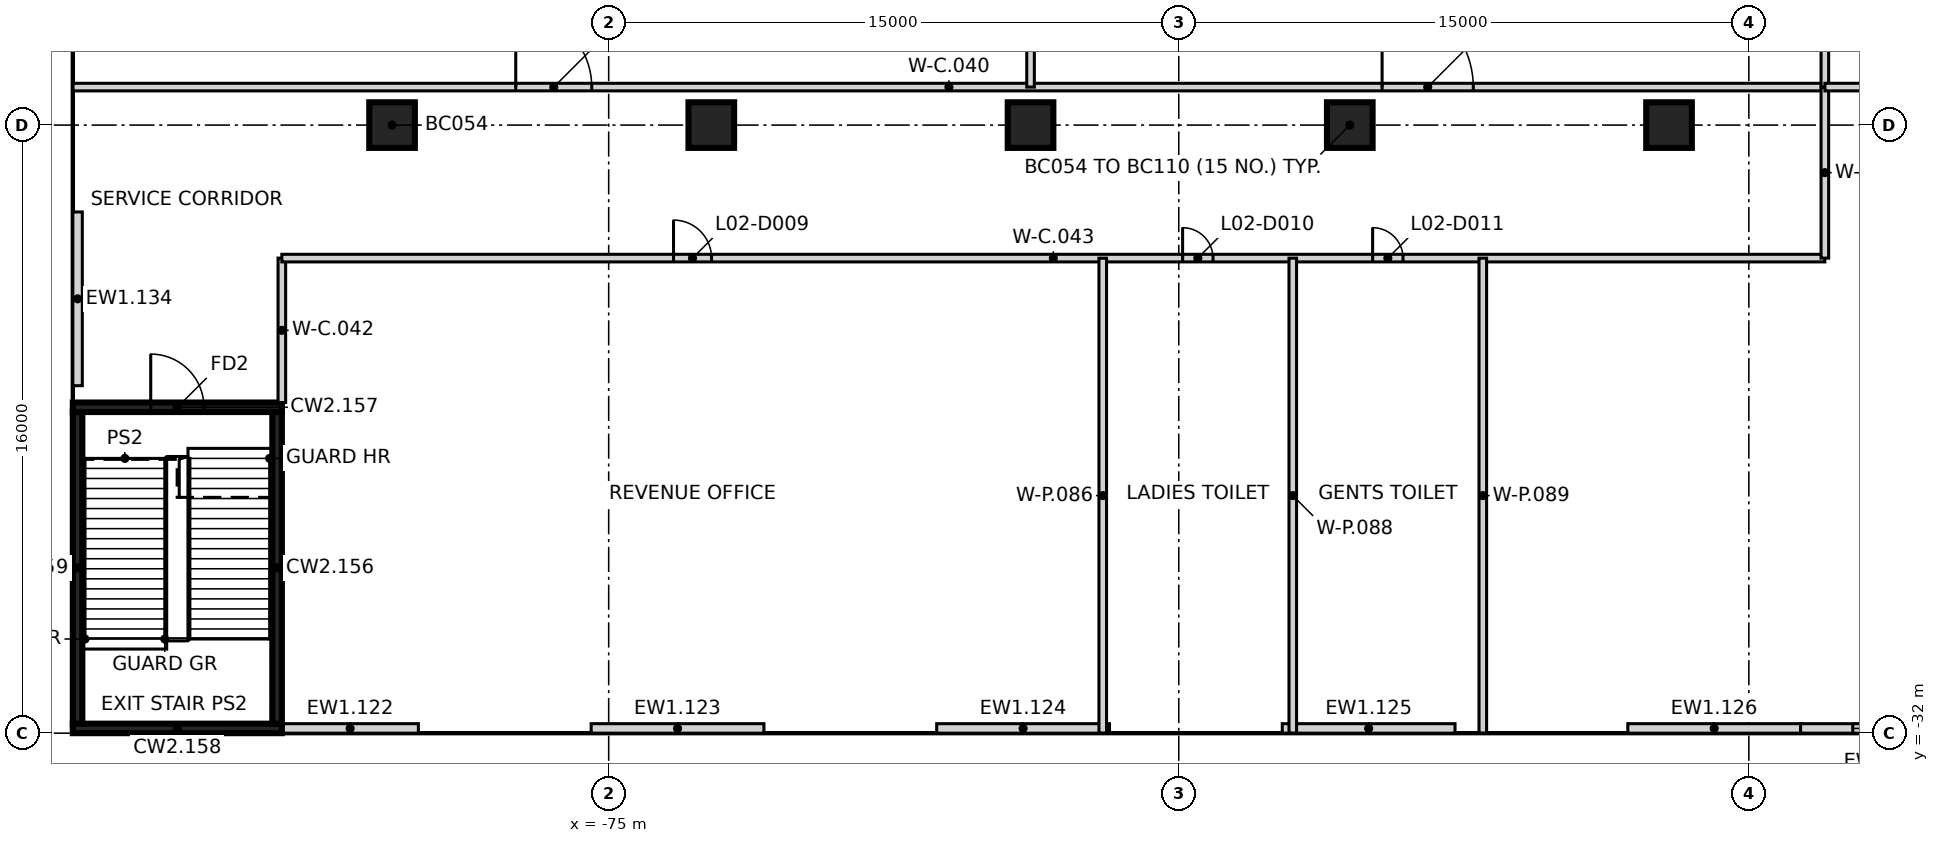
"""IFC4 building model, lengths in metres.
Left out: names, types, materials, properties, quantities, classifications, styles, units other than length and angle.
Written with IfcOpenShell. Run it as: python <this file> out.ifc"""

import sys

from ifc_helpers import new_model, si_unit, direction, frame, frame_2d, origin, origin_2d, place, context, subcontext, project, spatial, rectangle, extrude, element, fill, save


model = new_model("IFC4")
c1 = context("Model", 3, precision=1e-05, world=origin(), true_north=direction((0.0, 1.0)))
c2 = subcontext(c1, "Body", "Model", "MODEL_VIEW")
j1 = project(units=[si_unit("LENGTHUNIT", "METRE"), si_unit("PLANEANGLEUNIT", "RADIAN")], contexts=[c1])
p1 = place(None, origin())
s1 = spatial("IfcSite", under=j1, at=p1, CompositionType="ELEMENT")
p2 = place(p1, origin())
s2 = spatial("IfcBuilding", under=s1, at=p2, CompositionType="ELEMENT")
p3 = place(p2, frame((0.0, 0.0, 14.0)))
s3 = spatial("IfcBuildingStorey", under=s2, at=p3, CompositionType="ELEMENT", Elevation=14.0)
for number, where, z_axis, x_axis in (
    (1, (-80.7, -16.0, -0.35), (0.0, 0.0, 1.0), (1.0, 0.0, 0.0)),
    (2, (-72.3, -16.0, -0.35), (0.0, 0.0, 1.0), (1.0, 0.0, 0.0)),
    (3, (-63.9, -16.0, -0.35), (0.0, 0.0, 1.0), (1.0, 0.0, 0.0)),
    (4, (-55.5, -16.0, -0.35), (0.0, 0.0, 1.0), (1.0, 0.0, 0.0)),
    (5, (-47.1, -16.0, -0.35), (0.0, 0.0, 1.0), (1.0, 0.0, 0.0)),
):
    element("IfcColumn", number, at=place(p3, frame(where, z_axis=z_axis, x_axis=x_axis)), inside=s3, PredefinedType="COLUMN", context=c2, shape_type="SweptSolid", body=[
        extrude(rectangle(XDim=1.2, YDim=1.2, at=origin_2d()), origin(), (0.0, 0.0, 1.0), 5.5),
    ])
p4 = place(p3, frame((-88.975, -22.857, 0.0), z_axis=(0.0, 0.0, 1.0), x_axis=(0.0, 1.0, 0.0)))
e6 = element("IfcWall", 6, at=p4, inside=s3, PredefinedType="SOLIDWALL", context=c2, shape_type="SweptSolid", body=[
    extrude(rectangle(XDim=4.572, YDim=0.25, at=frame_2d((2.286, 0.0))), origin(), (0.0, 0.0, 1.0), 5.15),
])
p5 = place(p3, frame((-80.008, -31.875, 0.0), z_axis=(0.0, 0.0, 1.0), x_axis=(-1.0, 0.0, 0.0)))
e7 = element("IfcWall", 7, at=p5, inside=s3, PredefinedType="SOLIDWALL", context=c2, shape_type="SweptSolid", body=[
    extrude(rectangle(XDim=3.592, YDim=0.25, at=frame_2d((1.796, 0.0))), origin(), (0.0, 0.0, 1.0), 5.15),
])
for number, where, z_axis, x_axis in (
    (8, (-70.915, -31.875, 0.0), (0.0, 0.0, 1.0), (-1.0, 0.0, 0.0)),
    (9, (-61.823, -31.875, 0.0), (0.0, 0.0, 1.0), (-1.0, 0.0, 0.0)),
    (10, (-52.731, -31.875, 0.0), (0.0, 0.0, 1.0), (-1.0, 0.0, 0.0)),
    (11, (-43.638, -31.875, 0.0), (0.0, 0.0, 1.0), (-1.0, 0.0, 0.0)),
):
    element("IfcWall", number, at=place(p3, frame(where, z_axis=z_axis, x_axis=x_axis)), inside=s3, PredefinedType="SOLIDWALL", context=c2, shape_type="SweptSolid", body=[
        extrude(rectangle(XDim=4.546, YDim=0.25, at=frame_2d((2.273, 0.0))), origin(), (0.0, 0.0, 1.0), 5.15),
    ])
p6 = place(p3, frame((-39.092, -31.875, 0.0), z_axis=(0.0, 0.0, 1.0), x_axis=(-1.0, 0.0, 0.0)))
e12 = element("IfcWall", 12, at=p6, inside=s3, PredefinedType="SOLIDWALL", context=c2, shape_type="SweptSolid", body=[
    extrude(rectangle(XDim=4.546, YDim=0.25, at=frame_2d((2.273, 0.0))), origin(), (0.0, 0.0, 1.0), 5.15),
])
p7 = place(p6, frame((1.373, 0.0, 1.1)))
e13 = element("IfcOpeningElement", 13, at=p7, cuts=e12, PredefinedType="OPENING", context=c2, shape_type="SweptSolid", body=[
    extrude(rectangle(XDim=1.8, YDim=1.5, at=frame_2d((0.9, 0.75))), frame((0.0, 0.135, 0.0), z_axis=(0.0, -1.0, 0.0), x_axis=(1.0, 0.0, 0.0)), (0.0, 0.0, 1.0), 0.27),
])
p8 = place(p3, frame((-89.1, -31.875, 0.0), z_axis=(0.0, 0.0, 1.0), x_axis=(1.0, 0.0, 0.0)))
e14 = element("IfcWall", 14, at=p8, inside=s3, PredefinedType="SHEAR", context=c2, shape_type="SweptSolid", body=[
    extrude(rectangle(XDim=5.5, YDim=0.25, at=frame_2d((2.75, 0.0))), origin(), (0.0, 0.0, 1.0), 5.15),
])
p9 = place(p3, frame((-89.1, -23.425, 0.0), z_axis=(0.0, 0.0, 1.0), x_axis=(1.0, 0.0, 0.0)))
e15 = element("IfcWall", 15, at=p9, inside=s3, PredefinedType="SHEAR", context=c2, shape_type="SweptSolid", body=[
    extrude(rectangle(XDim=5.5, YDim=0.25, at=frame_2d((2.75, 0.0))), origin(), (0.0, 0.0, 1.0), 5.15),
])
p10 = place(p9, frame((2.05, 0.0, 0.0)))
e16 = element("IfcOpeningElement", 16, at=p10, cuts=e15, PredefinedType="OPENING", context=c2, shape_type="SweptSolid", body=[
    extrude(rectangle(XDim=1.4, YDim=2.1, at=frame_2d((0.7, 1.05))), frame((0.0, 0.135, 0.0), z_axis=(0.0, -1.0, 0.0), x_axis=(1.0, 0.0, 0.0)), (0.0, 0.0, 1.0), 0.27),
])
for number, where, z_axis, x_axis in (
    (17, (-88.975, -31.75, 0.0), (0.0, 0.0, 1.0), (0.0, 1.0, 0.0)),
    (18, (-83.725, -31.75, 0.0), (0.0, 0.0, 1.0), (0.0, 1.0, 0.0)),
):
    element("IfcWall", number, at=place(p3, frame(where, z_axis=z_axis, x_axis=x_axis)), inside=s3, PredefinedType="SHEAR", context=c2, shape_type="SweptSolid", body=[
        extrude(rectangle(XDim=8.2, YDim=0.25, at=frame_2d((4.1, 0.0))), origin(), (0.0, 0.0, 1.0), 5.15),
    ])
p11 = place(p3, frame((-89.095, -15.0, 0.0), z_axis=(0.0, 0.0, 1.0), x_axis=(1.0, 0.0, 0.0)))
e19 = element("IfcWall", 19, at=p11, inside=s3, PredefinedType="PARTITIONING", context=c2, shape_type="SweptSolid", body=[
    extrude(rectangle(XDim=46.095, YDim=0.2, at=frame_2d((23.047, 0.0))), origin(), (0.0, 0.0, 1.0), 5.15),
])
p12 = place(p11, frame((11.649, 0.0, 0.0)))
e20 = element("IfcOpeningElement", 20, at=p12, cuts=e19, PredefinedType="OPENING", context=c2, shape_type="SweptSolid", body=[
    extrude(rectangle(XDim=2.0, YDim=2.1, at=frame_2d((1.0, 1.05))), frame((0.0, 0.11, 0.0), z_axis=(0.0, -1.0, 0.0), x_axis=(1.0, 0.0, 0.0)), (0.0, 0.0, 1.0), 0.22),
])
p13 = place(p11, frame((34.445, 0.0, 0.0)))
e21 = element("IfcOpeningElement", 21, at=p13, cuts=e19, PredefinedType="OPENING", context=c2, shape_type="SweptSolid", body=[
    extrude(rectangle(XDim=2.4, YDim=2.1, at=frame_2d((1.2, 1.05))), frame((0.0, 0.11, 0.0), z_axis=(0.0, -1.0, 0.0), x_axis=(1.0, 0.0, 0.0)), (0.0, 0.0, 1.0), 0.22),
])
p14 = place(p3, frame((-83.6, -23.3, 0.0), z_axis=(0.0, 0.0, 1.0), x_axis=(0.0, 1.0, 0.0)))
e22 = element("IfcWall", 22, at=p14, inside=s3, PredefinedType="PARTITIONING", context=c2, shape_type="SweptSolid", body=[
    extrude(rectangle(XDim=3.8, YDim=0.2, at=frame_2d((1.9, 0.0))), origin(), (0.0, 0.0, 1.0), 5.15),
])
p15 = place(p3, frame((-83.6, -19.5, 0.0), z_axis=(0.0, 0.0, 1.0), x_axis=(1.0, 0.0, 0.0)))
e23 = element("IfcWall", 23, at=p15, inside=s3, PredefinedType="PARTITIONING", context=c2, shape_type="SweptSolid", body=[
    extrude(rectangle(XDim=40.6, YDim=0.2, at=frame_2d((20.3, 0.0))), origin(), (0.0, 0.0, 1.0), 5.15),
])
p16 = place(p15, frame((10.306, 0.0, 0.0)))
e24 = element("IfcOpeningElement", 24, at=p16, cuts=e23, PredefinedType="OPENING", context=c2, shape_type="SweptSolid", body=[
    extrude(rectangle(XDim=1.0, YDim=2.1, at=frame_2d((0.5, 1.05))), frame((0.0, 0.11, 0.0), z_axis=(0.0, -1.0, 0.0), x_axis=(1.0, 0.0, 0.0)), (0.0, 0.0, 1.0), 0.22),
])
p17 = place(p15, frame((23.701, 0.0, 0.0)))
e25 = element("IfcOpeningElement", 25, at=p17, cuts=e23, PredefinedType="OPENING", context=c2, shape_type="SweptSolid", body=[
    extrude(rectangle(XDim=0.8, YDim=2.1, at=frame_2d((0.4, 1.05))), frame((0.0, 0.11, 0.0), z_axis=(0.0, -1.0, 0.0), x_axis=(1.0, 0.0, 0.0)), (0.0, 0.0, 1.0), 0.22),
])
p18 = place(p15, frame((28.701, 0.0, 0.0)))
e26 = element("IfcOpeningElement", 26, at=p18, cuts=e23, PredefinedType="OPENING", context=c2, shape_type="SweptSolid", body=[
    extrude(rectangle(XDim=0.8, YDim=2.1, at=frame_2d((0.4, 1.05))), frame((0.0, 0.11, 0.0), z_axis=(0.0, -1.0, 0.0), x_axis=(1.0, 0.0, 0.0)), (0.0, 0.0, 1.0), 0.22),
])
p19 = place(p3, frame((-43.0, -19.5, 0.0), z_axis=(0.0, 0.0, 1.0), x_axis=(0.0, 1.0, 0.0)))
e27 = element("IfcWall", 27, at=p19, inside=s3, PredefinedType="PARTITIONING", context=c2, shape_type="SweptSolid", body=[
    extrude(rectangle(XDim=4.498, YDim=0.2, at=frame_2d((2.249, 0.0))), origin(), (0.0, 0.0, 1.0), 5.15),
])
p20 = place(p3, frame((-63.9, -15.0, 0.0), z_axis=(0.0, 0.0, 1.0), x_axis=(0.0, 1.0, 0.0)))
e28 = element("IfcWall", 28, at=p20, inside=s3, PredefinedType="PARTITIONING", context=c2, shape_type="SweptSolid", body=[
    extrude(rectangle(XDim=30.0, YDim=0.2, at=frame_2d((15.0, 0.0))), origin(), (0.0, 0.0, 1.0), 5.15),
])
p21 = place(p20, frame((11.25, 0.0, 0.0)))
e29 = element("IfcOpeningElement", 29, at=p21, cuts=e28, PredefinedType="OPENING", context=c2, shape_type="SweptSolid", body=[
    extrude(rectangle(XDim=2.0, YDim=2.1, at=frame_2d((1.0, 1.05))), frame((0.0, 0.11, 0.0), z_axis=(0.0, -1.0, 0.0), x_axis=(1.0, 0.0, 0.0)), (0.0, 0.0, 1.0), 0.22),
])
for number, where, z_axis, x_axis in (
    (30, (-62.0, -31.995, 0.0), (0.0, 0.0, 1.0), (0.0, 1.0, 0.0)),
    (31, (-57.0, -31.995, 0.0), (0.0, 0.0, 1.0), (0.0, 1.0, 0.0)),
    (32, (-52.0, -31.995, 0.0), (0.0, 0.0, 1.0), (0.0, 1.0, 0.0)),
):
    element("IfcWall", number, at=place(p3, frame(where, z_axis=z_axis, x_axis=x_axis)), inside=s3, PredefinedType="PARTITIONING", context=c2, shape_type="SweptSolid", body=[
        extrude(rectangle(XDim=12.493, YDim=0.2, at=frame_2d((6.247, 0.0))), origin(), (0.0, 0.0, 1.0), 5.15),
    ])
p22 = place(p3, frame((-43.0, -15.0, 0.0), z_axis=(0.0, 0.0, 1.0), x_axis=(0.0, 1.0, 0.0)))
e33 = element("IfcWall", 33, at=p22, inside=s3, PredefinedType="PARTITIONING", context=c2, shape_type="SweptSolid", body=[
    extrude(rectangle(XDim=9.5, YDim=0.2, at=frame_2d((4.75, 0.0))), origin(), (0.0, 0.0, 1.0), 5.15),
])
p23 = place(p3, frame((-42.998, -15.0, 0.0), z_axis=(0.0, 0.0, 1.0), x_axis=(1.0, 0.0, 0.0)))
e34 = element("IfcWall", 34, at=p23, inside=s3, PredefinedType="PARTITIONING", context=c2, shape_type="SweptSolid", body=[
    extrude(rectangle(XDim=3.998, YDim=0.2, at=frame_2d((1.999, 0.0))), origin(), (0.0, 0.0, 1.0), 5.15),
])
p24 = place(p7, origin())
e35 = element("IfcWindow", 35, at=p24, inside=s3, PartitioningType="SINGLE_PANEL", PredefinedType="WINDOW", context=c2, shape_type="SweptSolid", body=[
    extrude(rectangle(XDim=1.8, YDim=1.5, at=frame_2d((0.9, 0.75))), frame((0.0, 0.03, 0.0), z_axis=(0.0, -1.0, 0.0), x_axis=(1.0, 0.0, 0.0)), (0.0, 0.0, 1.0), 0.06),
])
fill(e13, e35)
p25 = place(p10, origin())
e36 = element("IfcDoor", 36, at=p25, inside=s3, OperationType="SINGLE_SWING_RIGHT", PredefinedType="DOOR", context=c2, shape_type="SweptSolid", body=[
    extrude(rectangle(XDim=1.4, YDim=2.1, at=frame_2d((0.7, 1.05))), frame((0.0, 0.025, 0.0), z_axis=(0.0, -1.0, 0.0), x_axis=(1.0, 0.0, 0.0)), (0.0, 0.0, 1.0), 0.05),
])
fill(e16, e36)
p26 = place(p12, origin())
e37 = element("IfcDoor", 37, at=p26, inside=s3, OperationType="DOUBLE_DOOR_SINGLE_SWING", PredefinedType="DOOR", context=c2, shape_type="SweptSolid", body=[
    extrude(rectangle(XDim=2.0, YDim=2.1, at=frame_2d((1.0, 1.05))), frame((0.0, 0.025, 0.0), z_axis=(0.0, -1.0, 0.0), x_axis=(1.0, 0.0, 0.0)), (0.0, 0.0, 1.0), 0.05),
])
fill(e20, e37)
p27 = place(p13, origin())
e38 = element("IfcDoor", 38, at=p27, inside=s3, OperationType="DOUBLE_DOOR_SINGLE_SWING", PredefinedType="DOOR", context=c2, shape_type="SweptSolid", body=[
    extrude(rectangle(XDim=2.4, YDim=2.1, at=frame_2d((1.2, 1.05))), frame((0.0, 0.025, 0.0), z_axis=(0.0, -1.0, 0.0), x_axis=(1.0, 0.0, 0.0)), (0.0, 0.0, 1.0), 0.05),
])
fill(e21, e38)
p28 = place(p16, frame((1.0, 0.0, 0.0), z_axis=(0.0, 0.0, 1.0), x_axis=(-1.0, 0.0, 0.0)))
e39 = element("IfcDoor", 39, at=p28, inside=s3, OperationType="SINGLE_SWING_LEFT", PredefinedType="DOOR", context=c2, shape_type="SweptSolid", body=[
    extrude(rectangle(XDim=1.0, YDim=2.1, at=frame_2d((0.5, 1.05))), frame((0.0, 0.025, 0.0), z_axis=(0.0, -1.0, 0.0), x_axis=(1.0, 0.0, 0.0)), (0.0, 0.0, 1.0), 0.05),
])
fill(e24, e39)
p29 = place(p17, frame((0.8, 0.0, 0.0), z_axis=(0.0, 0.0, 1.0), x_axis=(-1.0, 0.0, 0.0)))
e40 = element("IfcDoor", 40, at=p29, inside=s3, OperationType="SINGLE_SWING_LEFT", PredefinedType="DOOR", context=c2, shape_type="SweptSolid", body=[
    extrude(rectangle(XDim=0.8, YDim=2.1, at=frame_2d((0.4, 1.05))), frame((0.0, 0.025, 0.0), z_axis=(0.0, -1.0, 0.0), x_axis=(1.0, 0.0, 0.0)), (0.0, 0.0, 1.0), 0.05),
])
fill(e25, e40)
p30 = place(p18, frame((0.8, 0.0, 0.0), z_axis=(0.0, 0.0, 1.0), x_axis=(-1.0, 0.0, 0.0)))
e41 = element("IfcDoor", 41, at=p30, inside=s3, OperationType="SINGLE_SWING_LEFT", PredefinedType="DOOR", context=c2, shape_type="SweptSolid", body=[
    extrude(rectangle(XDim=0.8, YDim=2.1, at=frame_2d((0.4, 1.05))), frame((0.0, 0.025, 0.0), z_axis=(0.0, -1.0, 0.0), x_axis=(1.0, 0.0, 0.0)), (0.0, 0.0, 1.0), 0.05),
])
fill(e26, e41)
save(model, sys.argv[1])
